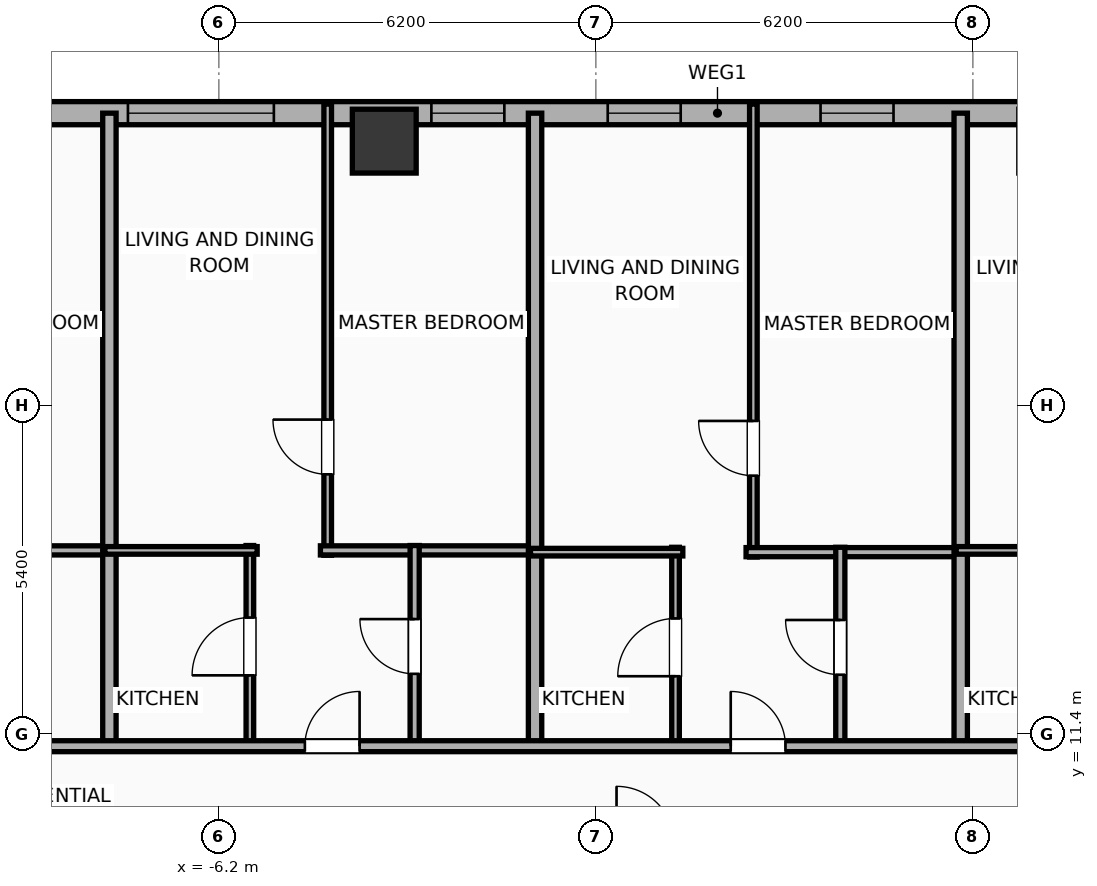
"""IFC4 building model, lengths in metres.
Left out: names, types, materials, properties, quantities, classifications, styles, units other than length and angle.
Written with IfcOpenShell. Run it as: python <this file> out.ifc"""

import sys

from ifc_helpers import new_model, si_unit, direction, frame, frame_2d, origin, origin_2d, place, context, subcontext, project, spatial, rectangle, hollow_rectangle, extrude, element, fill, save


model = new_model("IFC4")
c1 = context("Model", 3, precision=1e-05, world=origin(), true_north=direction((0.0, 1.0)))
c2 = subcontext(c1, "Body", "Model", "MODEL_VIEW")
j1 = project(units=[si_unit("LENGTHUNIT", "METRE"), si_unit("PLANEANGLEUNIT", "RADIAN")], contexts=[c1])
p1 = place(None, origin())
s1 = spatial("IfcSite", under=j1, at=p1, CompositionType="ELEMENT")
p2 = place(p1, origin())
s2 = spatial("IfcBuilding", under=s1, at=p2, CompositionType="ELEMENT")
p3 = place(p2, frame((0.0, 0.0, 120.9)))
s3 = spatial("IfcBuildingStorey", under=s2, at=p3, CompositionType="ELEMENT", Elevation=120.9)
p4 = place(p3, frame((-3.48, 21.15, 0.0), z_axis=(0.0, 0.0, 1.0), x_axis=(1.0, 0.0, 0.0)))
e1 = element("IfcColumn", 1, at=p4, inside=s3, PredefinedType="COLUMN", context=c2, shape_type="SweptSolid", body=[
    extrude(hollow_rectangle(XDim=1.05, YDim=1.05, WallThickness=0.036, at=origin_2d()), origin(), (0.0, 0.0, 1.0), 3.9),
])
p5 = place(p3, frame((-25.381, 21.61, 0.0), z_axis=(0.0, 0.0, 1.0), x_axis=(1.0, 0.0, 0.0)))
e2 = element("IfcWall", 2, at=p5, inside=s3, PredefinedType="ELEMENTEDWALL", context=c2, shape_type="SweptSolid", body=[
    extrude(rectangle(XDim=54.763, YDim=0.38, at=frame_2d((27.381, 0.0))), origin(), (0.0, 0.0, 1.0), 3.65),
])
p6 = place(p5, frame((7.295, 0.0, 0.75)))
e3 = element("IfcOpeningElement", 3, at=p6, cuts=e2, PredefinedType="OPENING", context=c2, shape_type="SweptSolid", body=[
    extrude(rectangle(XDim=2.4, YDim=2.1, at=frame_2d((1.2, 1.05))), frame((0.0, 0.2, 0.0), z_axis=(0.0, -1.0, 0.0), x_axis=(1.0, 0.0, 0.0)), (0.0, 0.0, 1.0), 0.4),
])
p7 = place(p5, frame((17.686, 0.0, 0.75)))
e4 = element("IfcOpeningElement", 4, at=p7, cuts=e2, PredefinedType="OPENING", context=c2, shape_type="SweptSolid", body=[
    extrude(rectangle(XDim=2.4, YDim=2.1, at=frame_2d((1.2, 1.05))), frame((0.0, 0.2, 0.0), z_axis=(0.0, -1.0, 0.0), x_axis=(1.0, 0.0, 0.0)), (0.0, 0.0, 1.0), 0.4),
])
p8 = place(p5, frame((45.867, 0.0, 0.75)))
e5 = element("IfcOpeningElement", 5, at=p8, cuts=e2, PredefinedType="OPENING", context=c2, shape_type="SweptSolid", body=[
    extrude(rectangle(XDim=2.4, YDim=2.1, at=frame_2d((1.2, 1.05))), frame((0.0, 0.2, 0.0), z_axis=(0.0, -1.0, 0.0), x_axis=(1.0, 0.0, 0.0)), (0.0, 0.0, 1.0), 0.4),
])
p9 = place(p5, frame((1.481, 0.0, 0.75)))
e6 = element("IfcOpeningElement", 6, at=p9, cuts=e2, PredefinedType="OPENING", context=c2, shape_type="SweptSolid", body=[
    extrude(rectangle(XDim=1.2, YDim=2.05, at=frame_2d((0.6, 1.025))), frame((0.0, 0.2, 0.0), z_axis=(0.0, -1.0, 0.0), x_axis=(1.0, 0.0, 0.0)), (0.0, 0.0, 1.0), 0.4),
])
p10 = place(p5, frame((4.522, 0.0, 0.75)))
e7 = element("IfcOpeningElement", 7, at=p10, cuts=e2, PredefinedType="OPENING", context=c2, shape_type="SweptSolid", body=[
    extrude(rectangle(XDim=1.2, YDim=2.05, at=frame_2d((0.6, 1.025))), frame((0.0, 0.2, 0.0), z_axis=(0.0, -1.0, 0.0), x_axis=(1.0, 0.0, 0.0)), (0.0, 0.0, 1.0), 0.4),
])
p11 = place(p5, frame((11.696, 0.0, 0.75)))
e8 = element("IfcOpeningElement", 8, at=p11, cuts=e2, PredefinedType="OPENING", context=c2, shape_type="SweptSolid", body=[
    extrude(rectangle(XDim=1.2, YDim=2.05, at=frame_2d((0.6, 1.025))), frame((0.0, 0.2, 0.0), z_axis=(0.0, -1.0, 0.0), x_axis=(1.0, 0.0, 0.0)), (0.0, 0.0, 1.0), 0.4),
])
p12 = place(p5, frame((15.076, 0.0, 0.75)))
e9 = element("IfcOpeningElement", 9, at=p12, cuts=e2, PredefinedType="OPENING", context=c2, shape_type="SweptSolid", body=[
    extrude(rectangle(XDim=1.2, YDim=2.05, at=frame_2d((0.6, 1.025))), frame((0.0, 0.2, 0.0), z_axis=(0.0, -1.0, 0.0), x_axis=(1.0, 0.0, 0.0)), (0.0, 0.0, 1.0), 0.4),
])
p13 = place(p5, frame((22.676, 0.0, 0.75)))
e10 = element("IfcOpeningElement", 10, at=p13, cuts=e2, PredefinedType="OPENING", context=c2, shape_type="SweptSolid", body=[
    extrude(rectangle(XDim=1.2, YDim=2.05, at=frame_2d((0.6, 1.025))), frame((0.0, 0.2, 0.0), z_axis=(0.0, -1.0, 0.0), x_axis=(1.0, 0.0, 0.0)), (0.0, 0.0, 1.0), 0.4),
])
p14 = place(p5, frame((25.576, 0.0, 0.75)))
e11 = element("IfcOpeningElement", 11, at=p14, cuts=e2, PredefinedType="OPENING", context=c2, shape_type="SweptSolid", body=[
    extrude(rectangle(XDim=1.2, YDim=2.05, at=frame_2d((0.6, 1.025))), frame((0.0, 0.2, 0.0), z_axis=(0.0, -1.0, 0.0), x_axis=(1.0, 0.0, 0.0)), (0.0, 0.0, 1.0), 0.4),
])
p15 = place(p5, frame((29.076, 0.0, 0.75)))
e12 = element("IfcOpeningElement", 12, at=p15, cuts=e2, PredefinedType="OPENING", context=c2, shape_type="SweptSolid", body=[
    extrude(rectangle(XDim=1.2, YDim=2.05, at=frame_2d((0.6, 1.025))), frame((0.0, 0.2, 0.0), z_axis=(0.0, -1.0, 0.0), x_axis=(1.0, 0.0, 0.0)), (0.0, 0.0, 1.0), 0.4),
])
p16 = place(p5, frame((33.591, 0.0, 0.75)))
e13 = element("IfcOpeningElement", 13, at=p16, cuts=e2, PredefinedType="OPENING", context=c2, shape_type="SweptSolid", body=[
    extrude(rectangle(XDim=0.85, YDim=2.05, at=frame_2d((0.425, 1.025))), frame((0.0, 0.2, 0.0), z_axis=(0.0, -1.0, 0.0), x_axis=(1.0, 0.0, 0.0)), (0.0, 0.0, 1.0), 0.4),
])
p17 = place(p5, frame((36.076, 0.0, 0.75)))
e14 = element("IfcOpeningElement", 14, at=p17, cuts=e2, PredefinedType="OPENING", context=c2, shape_type="SweptSolid", body=[
    extrude(rectangle(XDim=1.2, YDim=2.05, at=frame_2d((0.6, 1.025))), frame((0.0, 0.2, 0.0), z_axis=(0.0, -1.0, 0.0), x_axis=(1.0, 0.0, 0.0)), (0.0, 0.0, 1.0), 0.4),
])
p18 = place(p5, frame((39.446, 0.0, 0.75)))
e15 = element("IfcOpeningElement", 15, at=p18, cuts=e2, PredefinedType="OPENING", context=c2, shape_type="SweptSolid", body=[
    extrude(rectangle(XDim=1.2, YDim=2.05, at=frame_2d((0.6, 1.025))), frame((0.0, 0.2, 0.0), z_axis=(0.0, -1.0, 0.0), x_axis=(1.0, 0.0, 0.0)), (0.0, 0.0, 1.0), 0.4),
])
p19 = place(p5, frame((42.27, 0.0, 0.75)))
e16 = element("IfcOpeningElement", 16, at=p19, cuts=e2, PredefinedType="OPENING", context=c2, shape_type="SweptSolid", body=[
    extrude(rectangle(XDim=0.85, YDim=2.05, at=frame_2d((0.425, 1.025))), frame((0.0, 0.2, 0.0), z_axis=(0.0, -1.0, 0.0), x_axis=(1.0, 0.0, 0.0)), (0.0, 0.0, 1.0), 0.4),
])
p20 = place(p5, frame((49.554, 0.0, 0.75)))
e17 = element("IfcOpeningElement", 17, at=p20, cuts=e2, PredefinedType="OPENING", context=c2, shape_type="SweptSolid", body=[
    extrude(rectangle(XDim=1.2, YDim=2.05, at=frame_2d((0.6, 1.025))), frame((0.0, 0.2, 0.0), z_axis=(0.0, -1.0, 0.0), x_axis=(1.0, 0.0, 0.0)), (0.0, 0.0, 1.0), 0.4),
])
p21 = place(p5, frame((52.266, 0.0, 0.75)))
e18 = element("IfcOpeningElement", 18, at=p21, cuts=e2, PredefinedType="OPENING", context=c2, shape_type="SweptSolid", body=[
    extrude(rectangle(XDim=1.2, YDim=2.05, at=frame_2d((0.6, 1.025))), frame((0.0, 0.2, 0.0), z_axis=(0.0, -1.0, 0.0), x_axis=(1.0, 0.0, 0.0)), (0.0, 0.0, 1.0), 0.4),
])
p22 = place(p3, frame((-11.53, 14.42, 0.0), z_axis=(0.0, 0.0, 1.0), x_axis=(1.0, 0.0, 0.0)))
e19 = element("IfcWall", 19, at=p22, inside=s3, PredefinedType="PLUMBINGWALL", context=c2, shape_type="SweptSolid", body=[
    extrude(rectangle(XDim=3.605, YDim=0.15, at=frame_2d((1.802, 0.0))), origin(), (0.0, 0.0, 1.0), 3.65),
])
p23 = place(p3, frame((-8.0, 11.12, 0.0), z_axis=(0.0, 0.0, 1.0), x_axis=(0.0, 1.0, 0.0)))
e20 = element("IfcWall", 20, at=p23, inside=s3, PredefinedType="PARTITIONING", context=c2, shape_type="SweptSolid", body=[
    extrude(rectangle(XDim=10.49, YDim=0.22, at=frame_2d((5.245, 0.0))), origin(), (0.0, 0.0, 1.0), 3.65),
])
p24 = place(p3, frame((-4.41, 14.34, 0.0), z_axis=(0.0, 0.0, 1.0), x_axis=(0.0, 1.0, 0.0)))
e21 = element("IfcWall", 21, at=p24, inside=s3, PredefinedType="PARTITIONING", context=c2, shape_type="SweptSolid", body=[
    extrude(rectangle(XDim=7.42, YDim=0.125, at=frame_2d((3.71, 0.0))), origin(), (0.0, 0.0, 1.0), 3.65),
])
p25 = place(p24, frame((1.331, 0.0, 0.0)))
e22 = element("IfcOpeningElement", 22, at=p25, cuts=e21, PredefinedType="OPENING", context=c2, shape_type="SweptSolid", body=[
    extrude(rectangle(XDim=0.9, YDim=2.05, at=frame_2d((0.45, 1.025))), frame((0.0, 0.073, 0.0), z_axis=(0.0, -1.0, 0.0), x_axis=(1.0, 0.0, 0.0)), (0.0, 0.0, 1.0), 0.145),
])
p26 = place(p3, frame((-4.53, 14.42, 0.0), z_axis=(0.0, 0.0, 1.0), x_axis=(1.0, 0.0, 0.0)))
e23 = element("IfcWall", 23, at=p26, inside=s3, PredefinedType="PLUMBINGWALL", context=c2, shape_type="SweptSolid", body=[
    extrude(rectangle(XDim=3.605, YDim=0.15, at=frame_2d((1.802, 0.0))), origin(), (0.0, 0.0, 1.0), 3.65),
])
p27 = place(p3, frame((-5.69, 11.18, 0.0), z_axis=(0.0, 0.0, 1.0), x_axis=(0.0, 1.0, 0.0)))
e24 = element("IfcWall", 24, at=p27, inside=s3, PredefinedType="PARTITIONING", context=c2, shape_type="SweptSolid", body=[
    extrude(rectangle(XDim=3.32, YDim=0.125, at=frame_2d((1.66, 0.0))), origin(), (0.0, 0.0, 1.0), 3.65),
])
p28 = place(p27, frame((1.185, 0.0, 0.0)))
e25 = element("IfcOpeningElement", 25, at=p28, cuts=e24, PredefinedType="OPENING", context=c2, shape_type="SweptSolid", body=[
    extrude(rectangle(XDim=0.95, YDim=2.05, at=frame_2d((0.475, 1.025))), frame((0.0, 0.073, 0.0), z_axis=(0.0, -1.0, 0.0), x_axis=(1.0, 0.0, 0.0)), (0.0, 0.0, 1.0), 0.145),
])
p29 = place(p3, frame((-8.075, 14.42, 0.0), z_axis=(0.0, 0.0, 1.0), x_axis=(1.0, 0.0, 0.0)))
e26 = element("IfcWall", 26, at=p29, inside=s3, PredefinedType="PARTITIONING", context=c2, shape_type="SweptSolid", body=[
    extrude(rectangle(XDim=2.505, YDim=0.125, at=frame_2d((1.252, 0.0))), origin(), (0.0, 0.0, 1.0), 3.65),
])
p30 = place(p3, frame((-2.98, 11.18, 0.0), z_axis=(0.0, 0.0, 1.0), x_axis=(0.0, 1.0, 0.0)))
e27 = element("IfcWall", 27, at=p30, inside=s3, PredefinedType="PLUMBINGWALL", context=c2, shape_type="SweptSolid", body=[
    extrude(rectangle(XDim=3.32, YDim=0.15, at=frame_2d((1.66, 0.0))), origin(), (0.0, 0.0, 1.0), 3.65),
])
p31 = place(p30, frame((1.21, 0.0, 0.0)))
e28 = element("IfcOpeningElement", 28, at=p31, cuts=e27, PredefinedType="OPENING", context=c2, shape_type="SweptSolid", body=[
    extrude(rectangle(XDim=0.9, YDim=2.05, at=frame_2d((0.45, 1.025))), frame((0.0, 0.085, 0.0), z_axis=(0.0, -1.0, 0.0), x_axis=(1.0, 0.0, 0.0)), (0.0, 0.0, 1.0), 0.17),
])
p32 = place(p3, frame((-1.0, 11.12, 0.0), z_axis=(0.0, 0.0, 1.0), x_axis=(0.0, 1.0, 0.0)))
e29 = element("IfcWall", 29, at=p32, inside=s3, PredefinedType="PARTITIONING", context=c2, shape_type="SweptSolid", body=[
    extrude(rectangle(XDim=10.49, YDim=0.22, at=frame_2d((5.245, 0.0))), origin(), (0.0, 0.0, 1.0), 3.65),
])
p33 = place(p3, frame((2.59, 14.311, 0.0), z_axis=(0.0, 0.0, 1.0), x_axis=(0.0, 1.0, 0.0)))
e30 = element("IfcWall", 30, at=p33, inside=s3, PredefinedType="PARTITIONING", context=c2, shape_type="SweptSolid", body=[
    extrude(rectangle(XDim=7.449, YDim=0.125, at=frame_2d((3.725, 0.0))), origin(), (0.0, 0.0, 1.0), 3.65),
])
p34 = place(p33, frame((1.338, 0.0, 0.0)))
e31 = element("IfcOpeningElement", 31, at=p34, cuts=e30, PredefinedType="OPENING", context=c2, shape_type="SweptSolid", body=[
    extrude(rectangle(XDim=0.9, YDim=2.05, at=frame_2d((0.45, 1.025))), frame((0.0, 0.073, 0.0), z_axis=(0.0, -1.0, 0.0), x_axis=(1.0, 0.0, 0.0)), (0.0, 0.0, 1.0), 0.145),
])
p35 = place(p3, frame((2.47, 14.391, 0.0), z_axis=(0.0, 0.0, 1.0), x_axis=(1.0, 0.0, 0.0)))
e32 = element("IfcWall", 32, at=p35, inside=s3, PredefinedType="PLUMBINGWALL", context=c2, shape_type="SweptSolid", body=[
    extrude(rectangle(XDim=3.605, YDim=0.15, at=frame_2d((1.802, 0.0))), origin(), (0.0, 0.0, 1.0), 3.65),
])
p36 = place(p3, frame((1.31, 11.18, 0.0), z_axis=(0.0, 0.0, 1.0), x_axis=(0.0, 1.0, 0.0)))
e33 = element("IfcWall", 33, at=p36, inside=s3, PredefinedType="PARTITIONING", context=c2, shape_type="SweptSolid", body=[
    extrude(rectangle(XDim=3.291, YDim=0.125, at=frame_2d((1.646, 0.0))), origin(), (0.0, 0.0, 1.0), 3.65),
])
p37 = place(p36, frame((1.17, 0.0, 0.0)))
e34 = element("IfcOpeningElement", 34, at=p37, cuts=e33, PredefinedType="OPENING", context=c2, shape_type="SweptSolid", body=[
    extrude(rectangle(XDim=0.95, YDim=2.05, at=frame_2d((0.475, 1.025))), frame((0.0, 0.073, 0.0), z_axis=(0.0, -1.0, 0.0), x_axis=(1.0, 0.0, 0.0)), (0.0, 0.0, 1.0), 0.145),
])
p38 = place(p3, frame((-1.075, 14.391, 0.0), z_axis=(0.0, 0.0, 1.0), x_axis=(1.0, 0.0, 0.0)))
e35 = element("IfcWall", 35, at=p38, inside=s3, PredefinedType="PARTITIONING", context=c2, shape_type="SweptSolid", body=[
    extrude(rectangle(XDim=2.505, YDim=0.125, at=frame_2d((1.252, 0.0))), origin(), (0.0, 0.0, 1.0), 3.65),
])
p39 = place(p3, frame((4.02, 11.18, 0.0), z_axis=(0.0, 0.0, 1.0), x_axis=(0.0, 1.0, 0.0)))
e36 = element("IfcWall", 36, at=p39, inside=s3, PredefinedType="PLUMBINGWALL", context=c2, shape_type="SweptSolid", body=[
    extrude(rectangle(XDim=3.291, YDim=0.15, at=frame_2d((1.646, 0.0))), origin(), (0.0, 0.0, 1.0), 3.65),
])
p40 = place(p39, frame((1.196, 0.0, 0.0)))
e37 = element("IfcOpeningElement", 37, at=p40, cuts=e36, PredefinedType="OPENING", context=c2, shape_type="SweptSolid", body=[
    extrude(rectangle(XDim=0.9, YDim=2.05, at=frame_2d((0.45, 1.025))), frame((0.0, 0.085, 0.0), z_axis=(0.0, -1.0, 0.0), x_axis=(1.0, 0.0, 0.0)), (0.0, 0.0, 1.0), 0.17),
])
p41 = place(p3, frame((6.0, 11.12, 0.0), z_axis=(0.0, 0.0, 1.0), x_axis=(0.0, 1.0, 0.0)))
e38 = element("IfcWall", 38, at=p41, inside=s3, PredefinedType="PARTITIONING", context=c2, shape_type="SweptSolid", body=[
    extrude(rectangle(XDim=10.49, YDim=0.22, at=frame_2d((5.245, 0.0))), origin(), (0.0, 0.0, 1.0), 3.04),
])
p42 = place(p3, frame((5.925, 14.42, 0.0), z_axis=(0.0, 0.0, 1.0), x_axis=(1.0, 0.0, 0.0)))
e39 = element("IfcWall", 39, at=p42, inside=s3, PredefinedType="PARTITIONING", context=c2, shape_type="SweptSolid", body=[
    extrude(rectangle(XDim=2.505, YDim=0.125, at=frame_2d((1.252, 0.0))), origin(), (0.0, 0.0, 1.0), 3.65),
])
p43 = place(p3, frame((-29.21, 11.2, 0.0), z_axis=(0.0, 0.0, 1.0), x_axis=(1.0, 0.0, 0.0)))
e40 = element("IfcWall", 40, at=p43, inside=s3, PredefinedType="PARTITIONING", context=c2, shape_type="SweptSolid", body=[
    extrude(rectangle(XDim=62.42, YDim=0.18, at=frame_2d((31.21, 0.0))), origin(), (0.0, 0.0, 1.0), 3.65),
])
p44 = place(p43, frame((3.108, 0.0, 0.0)))
e41 = element("IfcOpeningElement", 41, at=p44, cuts=e40, PredefinedType="OPENING", context=c2, shape_type="SweptSolid", body=[
    extrude(rectangle(XDim=1.15, YDim=2.05, at=frame_2d((0.575, 1.025))), frame((0.0, 0.1, 0.0), z_axis=(0.0, -1.0, 0.0), x_axis=(1.0, 0.0, 0.0)), (0.0, 0.0, 1.0), 0.2),
])
p45 = place(p43, frame((10.242, 0.0, 0.0)))
e42 = element("IfcOpeningElement", 42, at=p45, cuts=e40, PredefinedType="OPENING", context=c2, shape_type="SweptSolid", body=[
    extrude(rectangle(XDim=1.15, YDim=2.05, at=frame_2d((0.575, 1.025))), frame((0.0, 0.1, 0.0), z_axis=(0.0, -1.0, 0.0), x_axis=(1.0, 0.0, 0.0)), (0.0, 0.0, 1.0), 0.2),
])
p46 = place(p43, frame((17.427, 0.0, 0.0)))
e43 = element("IfcOpeningElement", 43, at=p46, cuts=e40, PredefinedType="OPENING", context=c2, shape_type="SweptSolid", body=[
    extrude(rectangle(XDim=0.9, YDim=2.05, at=frame_2d((0.45, 1.025))), frame((0.0, 0.1, 0.0), z_axis=(0.0, -1.0, 0.0), x_axis=(1.0, 0.0, 0.0)), (0.0, 0.0, 1.0), 0.2),
])
p47 = place(p43, frame((24.424, 0.0, 0.0)))
e44 = element("IfcOpeningElement", 44, at=p47, cuts=e40, PredefinedType="OPENING", context=c2, shape_type="SweptSolid", body=[
    extrude(rectangle(XDim=0.9, YDim=2.05, at=frame_2d((0.45, 1.025))), frame((0.0, 0.1, 0.0), z_axis=(0.0, -1.0, 0.0), x_axis=(1.0, 0.0, 0.0)), (0.0, 0.0, 1.0), 0.2),
])
p48 = place(p43, frame((31.428, 0.0, 0.0)))
e45 = element("IfcOpeningElement", 45, at=p48, cuts=e40, PredefinedType="OPENING", context=c2, shape_type="SweptSolid", body=[
    extrude(rectangle(XDim=0.9, YDim=2.05, at=frame_2d((0.45, 1.025))), frame((0.0, 0.1, 0.0), z_axis=(0.0, -1.0, 0.0), x_axis=(1.0, 0.0, 0.0)), (0.0, 0.0, 1.0), 0.2),
])
p49 = place(p43, frame((38.425, 0.0, 0.0)))
e46 = element("IfcOpeningElement", 46, at=p49, cuts=e40, PredefinedType="OPENING", context=c2, shape_type="SweptSolid", body=[
    extrude(rectangle(XDim=0.9, YDim=2.05, at=frame_2d((0.45, 1.025))), frame((0.0, 0.1, 0.0), z_axis=(0.0, -1.0, 0.0), x_axis=(1.0, 0.0, 0.0)), (0.0, 0.0, 1.0), 0.2),
])
p50 = place(p43, frame((45.298, 0.0, 0.0)))
e47 = element("IfcOpeningElement", 47, at=p50, cuts=e40, PredefinedType="OPENING", context=c2, shape_type="SweptSolid", body=[
    extrude(rectangle(XDim=0.9, YDim=2.05, at=frame_2d((0.45, 1.025))), frame((0.0, 0.1, 0.0), z_axis=(0.0, -1.0, 0.0), x_axis=(1.0, 0.0, 0.0)), (0.0, 0.0, 1.0), 0.2),
])
p51 = place(p43, frame((52.033, 0.0, 0.0)))
e48 = element("IfcOpeningElement", 48, at=p51, cuts=e40, PredefinedType="OPENING", context=c2, shape_type="SweptSolid", body=[
    extrude(rectangle(XDim=0.9, YDim=2.05, at=frame_2d((0.45, 1.025))), frame((0.0, 0.1, 0.0), z_axis=(0.0, -1.0, 0.0), x_axis=(1.0, 0.0, 0.0)), (0.0, 0.0, 1.0), 0.2),
])
p52 = place(p43, frame((58.805, 0.0, 0.0)))
e49 = element("IfcOpeningElement", 49, at=p52, cuts=e40, PredefinedType="OPENING", context=c2, shape_type="SweptSolid", body=[
    extrude(rectangle(XDim=0.9, YDim=2.05, at=frame_2d((0.45, 1.025))), frame((0.0, 0.1, 0.0), z_axis=(0.0, -1.0, 0.0), x_axis=(1.0, 0.0, 0.0)), (0.0, 0.0, 1.0), 0.2),
])
p53 = place(p7, origin())
e50 = element("IfcWindow", 50, at=p53, inside=s3, PartitioningType="SINGLE_PANEL", PredefinedType="WINDOW", context=c2, shape_type="SweptSolid", body=[
    extrude(rectangle(XDim=2.4, YDim=2.1, at=frame_2d((1.2, 1.05))), frame((0.0, 0.03, 0.0), z_axis=(0.0, -1.0, 0.0), x_axis=(1.0, 0.0, 0.0)), (0.0, 0.0, 1.0), 0.06),
])
fill(e4, e50)
p54 = place(p13, origin())
e51 = element("IfcWindow", 51, at=p54, inside=s3, PartitioningType="SINGLE_PANEL", PredefinedType="WINDOW", context=c2, shape_type="SweptSolid", body=[
    extrude(rectangle(XDim=1.2, YDim=2.05, at=frame_2d((0.6, 1.025))), frame((0.0, 0.03, 0.0), z_axis=(0.0, -1.0, 0.0), x_axis=(1.0, 0.0, 0.0)), (0.0, 0.0, 1.0), 0.06),
])
fill(e10, e51)
p55 = place(p14, origin())
e52 = element("IfcWindow", 52, at=p55, inside=s3, PartitioningType="SINGLE_PANEL", PredefinedType="WINDOW", context=c2, shape_type="SweptSolid", body=[
    extrude(rectangle(XDim=1.2, YDim=2.05, at=frame_2d((0.6, 1.025))), frame((0.0, 0.03, 0.0), z_axis=(0.0, -1.0, 0.0), x_axis=(1.0, 0.0, 0.0)), (0.0, 0.0, 1.0), 0.06),
])
fill(e11, e52)
p56 = place(p15, origin())
e53 = element("IfcWindow", 53, at=p56, inside=s3, PartitioningType="SINGLE_PANEL", PredefinedType="WINDOW", context=c2, shape_type="SweptSolid", body=[
    extrude(rectangle(XDim=1.2, YDim=2.05, at=frame_2d((0.6, 1.025))), frame((0.0, 0.03, 0.0), z_axis=(0.0, -1.0, 0.0), x_axis=(1.0, 0.0, 0.0)), (0.0, 0.0, 1.0), 0.06),
])
fill(e12, e53)
p57 = place(p25, origin())
e54 = element("IfcDoor", 54, at=p57, inside=s3, OperationType="SINGLE_SWING_RIGHT", PredefinedType="DOOR", context=c2, shape_type="SweptSolid", body=[
    extrude(rectangle(XDim=0.9, YDim=2.05, at=frame_2d((0.45, 1.025))), frame((0.0, 0.025, 0.0), z_axis=(0.0, -1.0, 0.0), x_axis=(1.0, 0.0, 0.0)), (0.0, 0.0, 1.0), 0.05),
])
fill(e22, e54)
p58 = place(p28, origin())
e55 = element("IfcDoor", 55, at=p58, inside=s3, OperationType="SINGLE_SWING_LEFT", PredefinedType="DOOR", context=c2, shape_type="SweptSolid", body=[
    extrude(rectangle(XDim=0.95, YDim=2.05, at=frame_2d((0.475, 1.025))), frame((0.0, 0.025, 0.0), z_axis=(0.0, -1.0, 0.0), x_axis=(1.0, 0.0, 0.0)), (0.0, 0.0, 1.0), 0.05),
])
fill(e25, e55)
p59 = place(p31, origin())
e56 = element("IfcDoor", 56, at=p59, inside=s3, OperationType="SINGLE_SWING_RIGHT", PredefinedType="DOOR", context=c2, shape_type="SweptSolid", body=[
    extrude(rectangle(XDim=0.9, YDim=2.05, at=frame_2d((0.45, 1.025))), frame((0.0, 0.025, 0.0), z_axis=(0.0, -1.0, 0.0), x_axis=(1.0, 0.0, 0.0)), (0.0, 0.0, 1.0), 0.05),
])
fill(e28, e56)
p60 = place(p34, origin())
e57 = element("IfcDoor", 57, at=p60, inside=s3, OperationType="SINGLE_SWING_RIGHT", PredefinedType="DOOR", context=c2, shape_type="SweptSolid", body=[
    extrude(rectangle(XDim=0.9, YDim=2.05, at=frame_2d((0.45, 1.025))), frame((0.0, 0.025, 0.0), z_axis=(0.0, -1.0, 0.0), x_axis=(1.0, 0.0, 0.0)), (0.0, 0.0, 1.0), 0.05),
])
fill(e31, e57)
p61 = place(p37, origin())
e58 = element("IfcDoor", 58, at=p61, inside=s3, OperationType="SINGLE_SWING_LEFT", PredefinedType="DOOR", context=c2, shape_type="SweptSolid", body=[
    extrude(rectangle(XDim=0.95, YDim=2.05, at=frame_2d((0.475, 1.025))), frame((0.0, 0.025, 0.0), z_axis=(0.0, -1.0, 0.0), x_axis=(1.0, 0.0, 0.0)), (0.0, 0.0, 1.0), 0.05),
])
fill(e34, e58)
p62 = place(p40, origin())
e59 = element("IfcDoor", 59, at=p62, inside=s3, OperationType="SINGLE_SWING_RIGHT", PredefinedType="DOOR", context=c2, shape_type="SweptSolid", body=[
    extrude(rectangle(XDim=0.9, YDim=2.05, at=frame_2d((0.45, 1.025))), frame((0.0, 0.025, 0.0), z_axis=(0.0, -1.0, 0.0), x_axis=(1.0, 0.0, 0.0)), (0.0, 0.0, 1.0), 0.05),
])
fill(e37, e59)
p63 = place(p47, origin())
e60 = element("IfcDoor", 60, at=p63, inside=s3, OperationType="SINGLE_SWING_RIGHT", PredefinedType="DOOR", context=c2, shape_type="SweptSolid", body=[
    extrude(rectangle(XDim=0.9, YDim=2.05, at=frame_2d((0.45, 1.025))), frame((0.0, 0.025, 0.0), z_axis=(0.0, -1.0, 0.0), x_axis=(1.0, 0.0, 0.0)), (0.0, 0.0, 1.0), 0.05),
])
fill(e44, e60)
p64 = place(p48, origin())
e61 = element("IfcDoor", 61, at=p64, inside=s3, OperationType="SINGLE_SWING_LEFT", PredefinedType="DOOR", context=c2, shape_type="SweptSolid", body=[
    extrude(rectangle(XDim=0.9, YDim=2.05, at=frame_2d((0.45, 1.025))), frame((0.0, 0.025, 0.0), z_axis=(0.0, -1.0, 0.0), x_axis=(1.0, 0.0, 0.0)), (0.0, 0.0, 1.0), 0.05),
])
fill(e45, e61)
save(model, sys.argv[1])
